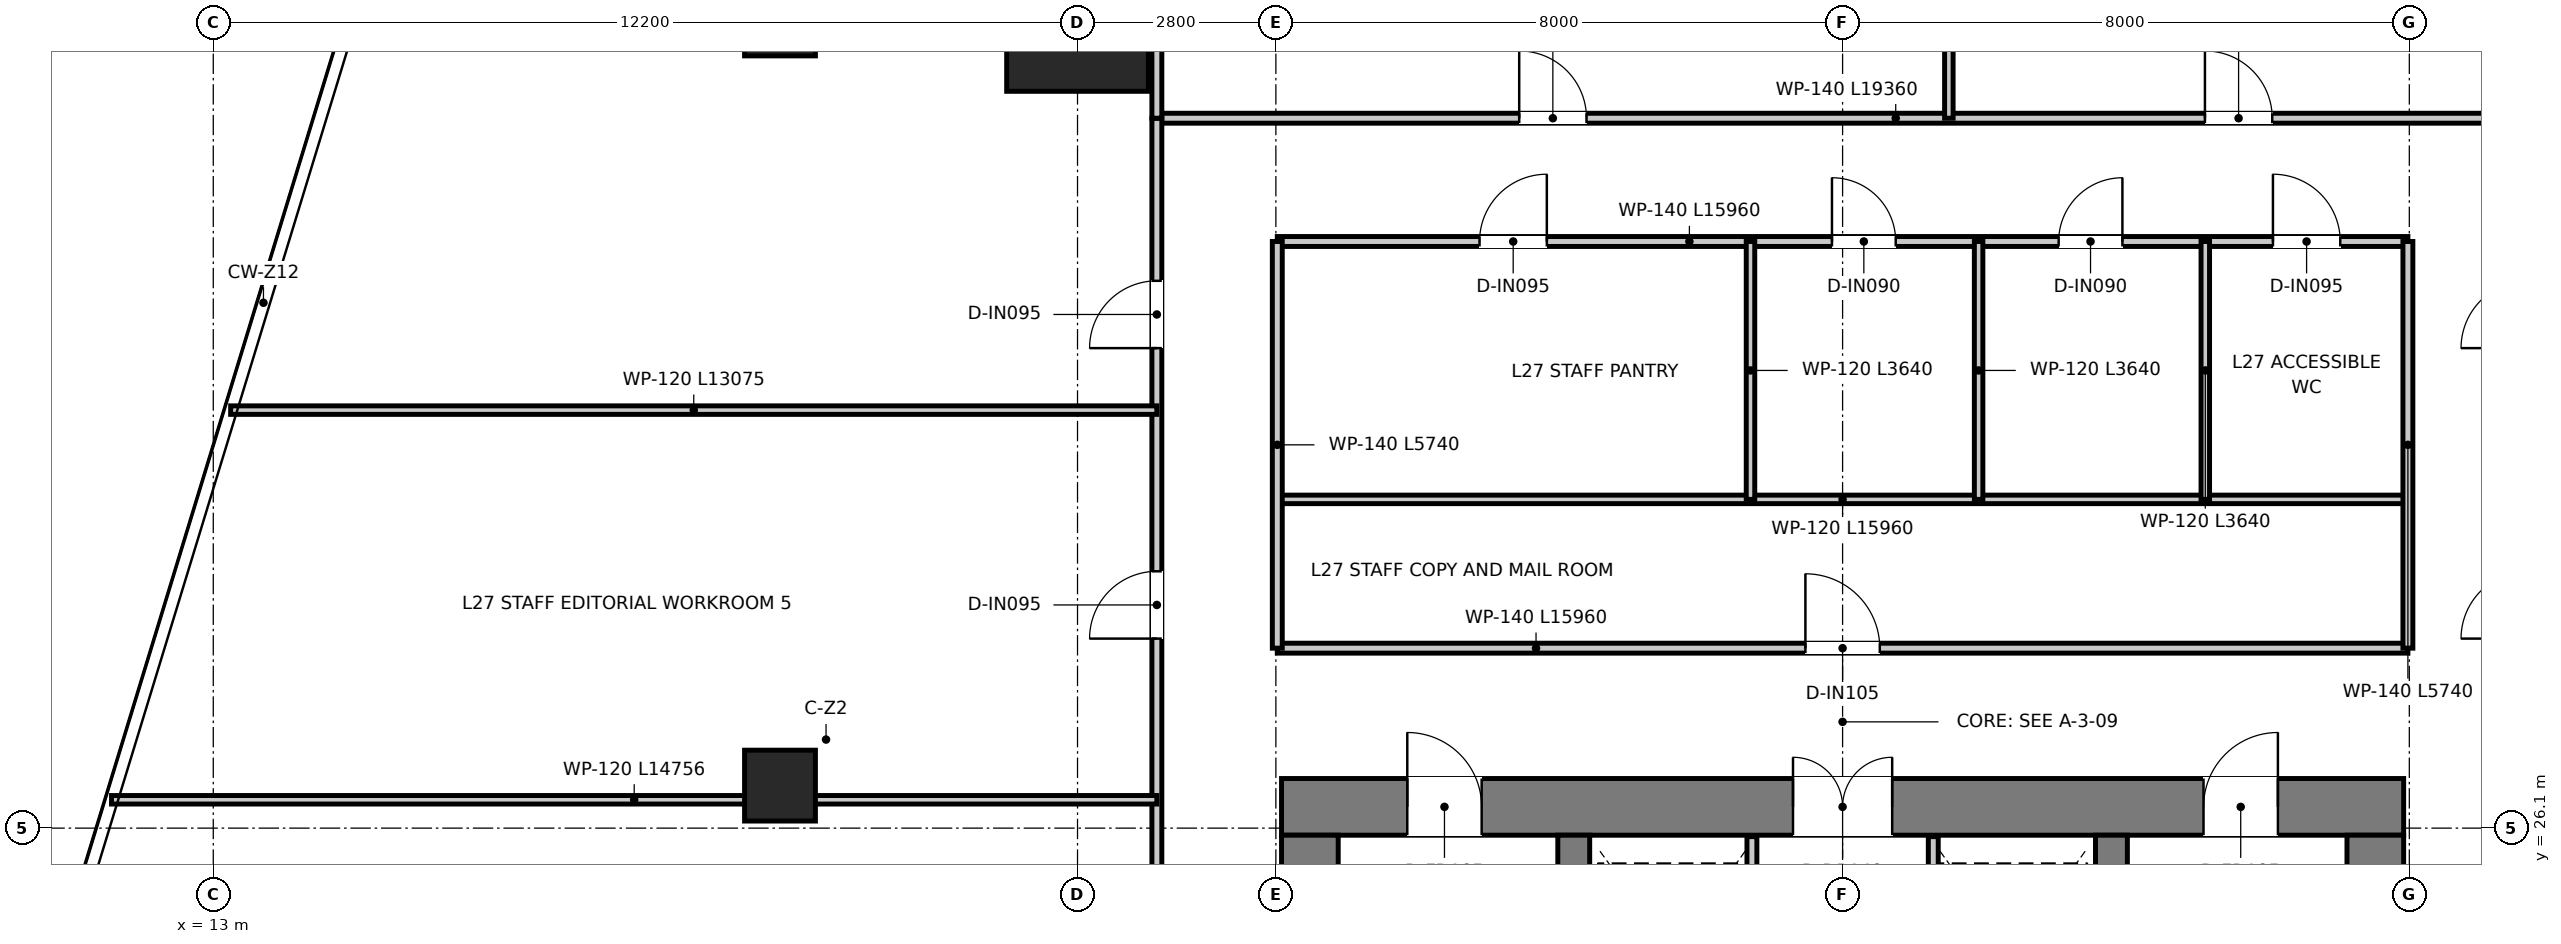
"""IFC4 building model, lengths in metres.
Left out: names, types, materials, properties, quantities, classifications, styles, units other than length and angle.
Written with IfcOpenShell. Run it as: python <this file> out.ifc"""

import sys

from ifc_helpers import new_model, si_unit, direction, frame, frame_2d, origin, origin_2d, place, context, subcontext, project, spatial, rectangle, extrude, source, transform, mapped, element, fill, save


model = new_model("IFC4")
c1 = context("Model", 3, precision=1e-05, world=origin(), true_north=direction((0.0, 1.0)))
c2 = subcontext(c1, "Body", "Model", "MODEL_VIEW")
j1 = project(units=[si_unit("LENGTHUNIT", "METRE"), si_unit("PLANEANGLEUNIT", "RADIAN")], contexts=[c1])
p1 = place(None, origin())
s1 = spatial("IfcSite", under=j1, at=p1, CompositionType="ELEMENT")
p2 = place(p1, origin())
s2 = spatial("IfcBuilding", under=s1, at=p2, CompositionType="ELEMENT")
p3 = place(p2, frame((0.0, 0.0, 113.75)))
s3 = spatial("IfcBuildingStorey", under=s2, at=p3, CompositionType="ELEMENT", Elevation=113.75)
p4 = place(p3, frame((28.08, 26.4, 0.0), z_axis=(0.0, 0.0, 1.0), x_axis=(1.0, 0.0, 0.0)))
e1 = element("IfcWall", 1, at=p4, inside=s3, PredefinedType="SHEAR", context=c2, shape_type="SweptSolid", body=[
    extrude(rectangle(XDim=15.84, YDim=0.8, at=frame_2d((7.92, 0.0))), origin(), (0.0, 0.0, 1.0), 3.95),
])
p5 = place(p4, frame((7.22, 0.0, 0.0)))
e2 = element("IfcOpeningElement", 2, at=p5, cuts=e1, PredefinedType="OPENING", context=c2, shape_type="SweptSolid", body=[
    extrude(rectangle(XDim=1.4, YDim=2.2, at=frame_2d((0.7, 1.1))), frame((0.0, 0.41, 0.0), z_axis=(0.0, -1.0, 0.0), x_axis=(1.0, 0.0, 0.0)), (0.0, 0.0, 1.0), 0.82),
])
p6 = place(p4, frame((1.775, 0.0, 0.0)))
e3 = element("IfcOpeningElement", 3, at=p6, cuts=e1, PredefinedType="OPENING", context=c2, shape_type="SweptSolid", body=[
    extrude(rectangle(XDim=1.05, YDim=2.1, at=frame_2d((0.525, 1.05))), frame((0.0, 0.41, 0.0), z_axis=(0.0, -1.0, 0.0), x_axis=(1.0, 0.0, 0.0)), (0.0, 0.0, 1.0), 0.82),
])
p7 = place(p4, frame((13.015, 0.0, 0.0)))
e4 = element("IfcOpeningElement", 4, at=p7, cuts=e1, PredefinedType="OPENING", context=c2, shape_type="SweptSolid", body=[
    extrude(rectangle(XDim=1.05, YDim=2.1, at=frame_2d((0.525, 1.05))), frame((0.0, 0.41, 0.0), z_axis=(0.0, -1.0, 0.0), x_axis=(1.0, 0.0, 0.0)), (0.0, 0.0, 1.0), 0.82),
])
for number, where, z_axis, x_axis in (
    (5, (28.48, 11.3, 0.0), (0.0, 0.0, 1.0), (0.0, 1.0, 0.0)),
    (6, (43.52, 11.3, 0.0), (0.0, 0.0, 1.0), (0.0, 1.0, 0.0)),
):
    element("IfcWall", number, at=place(p3, frame(where, z_axis=z_axis, x_axis=x_axis)), inside=s3, PredefinedType="SHEAR", context=c2, shape_type="SweptSolid", body=[
        extrude(rectangle(XDim=14.7, YDim=0.8, at=frame_2d((7.35, 0.0))), origin(), (0.0, 0.0, 1.0), 3.95),
    ])
p8 = place(p3, frame((32.205, 13.22, 0.0), z_axis=(0.0, 0.0, 1.0), x_axis=(0.0, 1.0, 0.0)))
e7 = element("IfcWall", 7, at=p8, inside=s3, PredefinedType="SHEAR", context=c2, shape_type="SweptSolid", body=[
    extrude(rectangle(XDim=12.78, YDim=0.45, at=frame_2d((6.39, 0.0))), origin(), (0.0, 0.0, 1.0), 3.95),
])
p9 = place(p8, frame((10.58, 0.0, 0.0)))
e8 = element("IfcOpeningElement", 8, at=p9, cuts=e7, PredefinedType="OPENING", context=c2, shape_type="SweptSolid", body=[
    extrude(rectangle(XDim=1.1, YDim=2.15, at=frame_2d((0.55, 1.075))), frame((0.0, 0.235, 0.0), z_axis=(0.0, -1.0, 0.0), x_axis=(1.0, 0.0, 0.0)), (0.0, 0.0, 1.0), 0.47),
])
p10 = place(p3, frame((39.795, 13.22, 0.0), z_axis=(0.0, 0.0, 1.0), x_axis=(0.0, 1.0, 0.0)))
e9 = element("IfcWall", 9, at=p10, inside=s3, PredefinedType="SHEAR", context=c2, shape_type="SweptSolid", body=[
    extrude(rectangle(XDim=12.78, YDim=0.45, at=frame_2d((6.39, 0.0))), origin(), (0.0, 0.0, 1.0), 3.95),
])
p11 = place(p10, frame((10.58, 0.0, 0.0)))
e10 = element("IfcOpeningElement", 10, at=p11, cuts=e9, PredefinedType="OPENING", context=c2, shape_type="SweptSolid", body=[
    extrude(rectangle(XDim=1.1, YDim=2.15, at=frame_2d((0.55, 1.075))), frame((0.0, 0.235, 0.0), z_axis=(0.0, -1.0, 0.0), x_axis=(1.0, 0.0, 0.0)), (0.0, 0.0, 1.0), 0.47),
])
m1 = source(origin(), c2, "Body", "SweptSolid", [
    extrude(rectangle(XDim=2.0, YDim=2.0, at=origin_2d()), origin(), (0.0, 0.0, 1.0), 3.95),
])
p12 = place(p3, frame((25.2, 37.5, 0.0), z_axis=(0.0, 0.0, 1.0), x_axis=(1.0, 0.0, 0.0)))
e11 = element("IfcColumn", 11, at=p12, inside=s3, PredefinedType="USERDEFINED", context=c2, shape_type="MappedRepresentation", body=[
    mapped(m1, transform((0.0, 0.0, 0.0), x_axis=(1.0, 0.0, 0.0), y_axis=(0.0, 1.0, 0.0), z_axis=(0.0, 0.0, 1.0), scale=1.0)),
])
m2 = source(origin(), c2, "Body", "SweptSolid", [
    extrude(rectangle(XDim=1.0, YDim=1.0, at=origin_2d()), origin(), (0.0, 0.0, 1.0), 3.95),
])
for number, where, z_axis, x_axis in (
    (12, (21.0, 26.7, 0.0), (0.0, 0.0, 1.0), (1.0, 0.0, 0.0)),
    (13, (21.0, 37.5, 0.0), (0.0, 0.0, 1.0), (1.0, 0.0, 0.0)),
):
    element("IfcColumn", number, at=place(p3, frame(where, z_axis=z_axis, x_axis=x_axis)), inside=s3, PredefinedType="COLUMN", context=c2, shape_type="MappedRepresentation", body=[
        mapped(m2, transform((0.0, 0.0, 0.0), x_axis=(1.0, 0.0, 0.0), y_axis=(0.0, 1.0, 0.0), z_axis=(0.0, 0.0, 1.0), scale=1.0)),
    ])
p13 = place(p3, frame((34.72, 20.2, 0.0), z_axis=(0.0, 0.0, 1.0), x_axis=(0.0, 1.0, 0.0)))
e14 = element("IfcWall", 14, at=p13, inside=s3, PredefinedType="PARTITIONING", context=c2, shape_type="SweptSolid", body=[
    extrude(rectangle(XDim=5.78, YDim=0.14, at=frame_2d((2.89, 0.0))), origin(), (0.0, 0.0, 1.0), 2.67),
])
p14 = place(p13, frame((1.05, 0.0, 0.0)))
e15 = element("IfcOpeningElement", 15, at=p14, cuts=e14, PredefinedType="OPENING", context=c2, shape_type="SweptSolid", body=[
    extrude(rectangle(XDim=0.9, YDim=2.1, at=frame_2d((0.45, 1.05))), frame((0.0, 0.08, 0.0), z_axis=(0.0, -1.0, 0.0), x_axis=(1.0, 0.0, 0.0)), (0.0, 0.0, 1.0), 0.16),
])
p15 = place(p3, frame((37.28, 20.2, 0.0), z_axis=(0.0, 0.0, 1.0), x_axis=(0.0, 1.0, 0.0)))
e16 = element("IfcWall", 16, at=p15, inside=s3, PredefinedType="PARTITIONING", context=c2, shape_type="SweptSolid", body=[
    extrude(rectangle(XDim=5.78, YDim=0.14, at=frame_2d((2.89, 0.0))), origin(), (0.0, 0.0, 1.0), 2.67),
])
p16 = place(p15, frame((0.95, 0.0, 0.0)))
e17 = element("IfcOpeningElement", 17, at=p16, cuts=e16, PredefinedType="OPENING", context=c2, shape_type="SweptSolid", body=[
    extrude(rectangle(XDim=1.1, YDim=2.15, at=frame_2d((0.55, 1.075))), frame((0.0, 0.08, 0.0), z_axis=(0.0, -1.0, 0.0), x_axis=(1.0, 0.0, 0.0)), (0.0, 0.0, 1.0), 0.16),
])
p17 = place(p3, frame((28.02, 28.64, 0.0), z_axis=(0.0, 0.0, 1.0), x_axis=(1.0, 0.0, 0.0)))
e18 = element("IfcWall", 18, at=p17, inside=s3, PredefinedType="PARTITIONING", context=c2, shape_type="SweptSolid", body=[
    extrude(rectangle(XDim=15.96, YDim=0.14, at=frame_2d((7.98, 0.0))), origin(), (0.0, 0.0, 1.0), 3.08),
])
p18 = place(p17, frame((7.455, 0.0, 0.0)))
e19 = element("IfcOpeningElement", 19, at=p18, cuts=e18, PredefinedType="OPENING", context=c2, shape_type="SweptSolid", body=[
    extrude(rectangle(XDim=1.05, YDim=2.15, at=frame_2d((0.525, 1.075))), frame((0.0, 0.08, 0.0), z_axis=(0.0, -1.0, 0.0), x_axis=(1.0, 0.0, 0.0)), (0.0, 0.0, 1.0), 0.16),
])
p19 = place(p3, frame((28.02, 30.74, 0.0), z_axis=(0.0, 0.0, 1.0), x_axis=(1.0, 0.0, 0.0)))
e20 = element("IfcWall", 20, at=p19, inside=s3, PredefinedType="PARTITIONING", context=c2, shape_type="SweptSolid", body=[
    extrude(rectangle(XDim=15.96, YDim=0.12, at=frame_2d((7.98, 0.0))), origin(), (0.0, 0.0, 1.0), 3.08),
])
p20 = place(p3, frame((28.02, 34.38, 0.0), z_axis=(0.0, 0.0, 1.0), x_axis=(1.0, 0.0, 0.0)))
e21 = element("IfcWall", 21, at=p20, inside=s3, PredefinedType="PARTITIONING", context=c2, shape_type="SweptSolid", body=[
    extrude(rectangle(XDim=15.96, YDim=0.14, at=frame_2d((7.98, 0.0))), origin(), (0.0, 0.0, 1.0), 3.08),
])
p21 = place(p20, frame((7.83, 0.0, 0.0)))
e22 = element("IfcOpeningElement", 22, at=p21, cuts=e21, PredefinedType="OPENING", context=c2, shape_type="SweptSolid", body=[
    extrude(rectangle(XDim=0.9, YDim=2.1, at=frame_2d((0.45, 1.05))), frame((0.0, 0.08, 0.0), z_axis=(0.0, -1.0, 0.0), x_axis=(1.0, 0.0, 0.0)), (0.0, 0.0, 1.0), 0.16),
])
p22 = place(p20, frame((11.03, 0.0, 0.0)))
e23 = element("IfcOpeningElement", 23, at=p22, cuts=e21, PredefinedType="OPENING", context=c2, shape_type="SweptSolid", body=[
    extrude(rectangle(XDim=0.9, YDim=2.1, at=frame_2d((0.45, 1.05))), frame((0.0, 0.08, 0.0), z_axis=(0.0, -1.0, 0.0), x_axis=(1.0, 0.0, 0.0)), (0.0, 0.0, 1.0), 0.16),
])
p23 = place(p20, frame((14.055, 0.0, 0.0)))
e24 = element("IfcOpeningElement", 24, at=p23, cuts=e21, PredefinedType="OPENING", context=c2, shape_type="SweptSolid", body=[
    extrude(rectangle(XDim=0.95, YDim=2.1, at=frame_2d((0.475, 1.05))), frame((0.0, 0.08, 0.0), z_axis=(0.0, -1.0, 0.0), x_axis=(1.0, 0.0, 0.0)), (0.0, 0.0, 1.0), 0.16),
])
p24 = place(p20, frame((2.855, 0.0, 0.0)))
e25 = element("IfcOpeningElement", 25, at=p24, cuts=e21, PredefinedType="OPENING", context=c2, shape_type="SweptSolid", body=[
    extrude(rectangle(XDim=0.95, YDim=2.1, at=frame_2d((0.475, 1.05))), frame((0.0, 0.08, 0.0), z_axis=(0.0, -1.0, 0.0), x_axis=(1.0, 0.0, 0.0)), (0.0, 0.0, 1.0), 0.16),
])
for number, where, z_axis, x_axis in (
    (26, (28.02, 28.64, 0.0), (0.0, 0.0, 1.0), (0.0, 1.0, 0.0)),
    (27, (43.98, 28.64, 0.0), (0.0, 0.0, 1.0), (0.0, 1.0, 0.0)),
):
    element("IfcWall", number, at=place(p3, frame(where, z_axis=z_axis, x_axis=x_axis)), inside=s3, PredefinedType="PARTITIONING", context=c2, shape_type="SweptSolid", body=[
        extrude(rectangle(XDim=5.74, YDim=0.14, at=frame_2d((2.87, 0.0))), origin(), (0.0, 0.0, 1.0), 3.27),
    ])
for number, where, z_axis, x_axis in (
    (28, (37.92, 30.74, 0.0), (0.0, 0.0, 1.0), (0.0, 1.0, 0.0)),
    (29, (41.12, 30.74, 0.0), (0.0, 0.0, 1.0), (0.0, 1.0, 0.0)),
    (30, (34.7, 30.74, 0.0), (0.0, 0.0, 1.0), (0.0, 1.0, 0.0)),
):
    element("IfcWall", number, at=place(p3, frame(where, z_axis=z_axis, x_axis=x_axis)), inside=s3, PredefinedType="PARTITIONING", context=c2, shape_type="SweptSolid", body=[
        extrude(rectangle(XDim=3.64, YDim=0.12, at=frame_2d((1.82, 0.0))), origin(), (0.0, 0.0, 1.0), 3.17),
    ])
p25 = place(p3, frame((26.32, 36.12, 0.0), z_axis=(0.0, 0.0, 1.0), x_axis=(1.0, 0.0, 0.0)))
e31 = element("IfcWall", 31, at=p25, inside=s3, PredefinedType="PARTITIONING", context=c2, shape_type="SweptSolid", body=[
    extrude(rectangle(XDim=19.36, YDim=0.14, at=frame_2d((9.68, 0.0))), origin(), (0.0, 0.0, 1.0), 3.08),
])
p26 = place(p25, frame((5.115, 0.0, 0.0)))
e32 = element("IfcOpeningElement", 32, at=p26, cuts=e31, PredefinedType="OPENING", context=c2, shape_type="SweptSolid", body=[
    extrude(rectangle(XDim=0.95, YDim=2.1, at=frame_2d((0.475, 1.05))), frame((0.0, 0.08, 0.0), z_axis=(0.0, -1.0, 0.0), x_axis=(1.0, 0.0, 0.0)), (0.0, 0.0, 1.0), 0.16),
])
p27 = place(p25, frame((14.795, 0.0, 0.0)))
e33 = element("IfcOpeningElement", 33, at=p27, cuts=e31, PredefinedType="OPENING", context=c2, shape_type="SweptSolid", body=[
    extrude(rectangle(XDim=0.95, YDim=2.1, at=frame_2d((0.475, 1.05))), frame((0.0, 0.08, 0.0), z_axis=(0.0, -1.0, 0.0), x_axis=(1.0, 0.0, 0.0)), (0.0, 0.0, 1.0), 0.16),
])
p28 = place(p3, frame((26.32, 10.5, 0.0), z_axis=(0.0, 0.0, 1.0), x_axis=(0.0, 1.0, 0.0)))
e34 = element("IfcWall", 34, at=p28, inside=s3, PredefinedType="PARTITIONING", context=c2, shape_type="SweptSolid", body=[
    extrude(rectangle(XDim=25.62, YDim=0.14, at=frame_2d((12.81, 0.0))), origin(), (0.0, 0.0, 1.0), 2.97),
])
p29 = place(p28, frame((8.275, 0.0, 0.0)))
e35 = element("IfcOpeningElement", 35, at=p29, cuts=e34, PredefinedType="OPENING", context=c2, shape_type="SweptSolid", body=[
    extrude(rectangle(XDim=0.95, YDim=2.1, at=frame_2d((0.475, 1.05))), frame((0.0, 0.08, 0.0), z_axis=(0.0, -1.0, 0.0), x_axis=(1.0, 0.0, 0.0)), (0.0, 0.0, 1.0), 0.16),
])
p30 = place(p28, frame((12.775, 0.0, 0.0)))
e36 = element("IfcOpeningElement", 36, at=p30, cuts=e34, PredefinedType="OPENING", context=c2, shape_type="SweptSolid", body=[
    extrude(rectangle(XDim=0.95, YDim=2.1, at=frame_2d((0.475, 1.05))), frame((0.0, 0.08, 0.0), z_axis=(0.0, -1.0, 0.0), x_axis=(1.0, 0.0, 0.0)), (0.0, 0.0, 1.0), 0.16),
])
p31 = place(p28, frame((18.275, 0.0, 0.0)))
e37 = element("IfcOpeningElement", 37, at=p31, cuts=e34, PredefinedType="OPENING", context=c2, shape_type="SweptSolid", body=[
    extrude(rectangle(XDim=0.95, YDim=2.1, at=frame_2d((0.475, 1.05))), frame((0.0, 0.08, 0.0), z_axis=(0.0, -1.0, 0.0), x_axis=(1.0, 0.0, 0.0)), (0.0, 0.0, 1.0), 0.16),
])
p32 = place(p28, frame((22.375, 0.0, 0.0)))
e38 = element("IfcOpeningElement", 38, at=p32, cuts=e34, PredefinedType="OPENING", context=c2, shape_type="SweptSolid", body=[
    extrude(rectangle(XDim=0.95, YDim=2.1, at=frame_2d((0.475, 1.05))), frame((0.0, 0.08, 0.0), z_axis=(0.0, -1.0, 0.0), x_axis=(1.0, 0.0, 0.0)), (0.0, 0.0, 1.0), 0.16),
])
p33 = place(p3, frame((26.32, 36.12, 0.0), z_axis=(0.0, 0.0, 1.0), x_axis=(0.0, 1.0, 0.0)))
e39 = element("IfcWall", 39, at=p33, inside=s3, PredefinedType="PARTITIONING", context=c2, shape_type="SweptSolid", body=[
    extrude(rectangle(XDim=17.914, YDim=0.14, at=frame_2d((8.957, 0.0))), origin(), (0.0, 0.0, 1.0), 2.97),
])
p34 = place(p3, frame((37.5, 36.12, 0.0), z_axis=(0.0, 0.0, 1.0), x_axis=(0.0, 1.0, 0.0)))
e40 = element("IfcWall", 40, at=p34, inside=s3, PredefinedType="PARTITIONING", context=c2, shape_type="SweptSolid", body=[
    extrude(rectangle(XDim=14.496, YDim=0.12, at=frame_2d((7.248, 0.0))), origin(), (0.0, 0.0, 1.0), 2.97),
])
p35 = place(p3, frame((11.564, 26.5, 0.0), z_axis=(0.0, 0.0, 1.0), x_axis=(1.0, 0.0, 0.0)))
e41 = element("IfcWall", 41, at=p35, inside=s3, PredefinedType="PARTITIONING", context=c2, shape_type="SweptSolid", body=[
    extrude(rectangle(XDim=14.756, YDim=0.12, at=frame_2d((7.378, 0.0))), origin(), (0.0, 0.0, 1.0), 2.97),
])
p36 = place(p3, frame((13.245, 32.0, 0.0), z_axis=(0.0, 0.0, 1.0), x_axis=(1.0, 0.0, 0.0)))
e42 = element("IfcWall", 42, at=p36, inside=s3, PredefinedType="PARTITIONING", context=c2, shape_type="SweptSolid", body=[
    extrude(rectangle(XDim=13.075, YDim=0.12, at=frame_2d((6.537, 0.0))), origin(), (0.0, 0.0, 1.0), 2.97),
])
p37 = place(p5, origin())
e43 = element("IfcDoor", 43, at=p37, inside=s3, OperationType="DOUBLE_DOOR_SINGLE_SWING", PredefinedType="DOOR", context=c2, shape_type="SweptSolid", body=[
    extrude(rectangle(XDim=1.4, YDim=2.2, at=frame_2d((0.7, 1.1))), frame((0.0, 0.025, 0.0), z_axis=(0.0, -1.0, 0.0), x_axis=(1.0, 0.0, 0.0)), (0.0, 0.0, 1.0), 0.05),
])
fill(e2, e43)
p38 = place(p6, origin())
e44 = element("IfcDoor", 44, at=p38, inside=s3, OperationType="SINGLE_SWING_LEFT", PredefinedType="DOOR", context=c2, shape_type="SweptSolid", body=[
    extrude(rectangle(XDim=1.05, YDim=2.1, at=frame_2d((0.525, 1.05))), frame((0.0, 0.025, 0.0), z_axis=(0.0, -1.0, 0.0), x_axis=(1.0, 0.0, 0.0)), (0.0, 0.0, 1.0), 0.05),
])
fill(e3, e44)
p39 = place(p7, origin())
e45 = element("IfcDoor", 45, at=p39, inside=s3, OperationType="SINGLE_SWING_RIGHT", PredefinedType="DOOR", context=c2, shape_type="SweptSolid", body=[
    extrude(rectangle(XDim=1.05, YDim=2.1, at=frame_2d((0.525, 1.05))), frame((0.0, 0.025, 0.0), z_axis=(0.0, -1.0, 0.0), x_axis=(1.0, 0.0, 0.0)), (0.0, 0.0, 1.0), 0.05),
])
fill(e4, e45)
p40 = place(p18, origin())
e46 = element("IfcDoor", 46, at=p40, inside=s3, OperationType="SINGLE_SWING_LEFT", PredefinedType="DOOR", context=c2, shape_type="SweptSolid", body=[
    extrude(rectangle(XDim=1.05, YDim=2.15, at=frame_2d((0.525, 1.075))), frame((0.0, 0.025, 0.0), z_axis=(0.0, -1.0, 0.0), x_axis=(1.0, 0.0, 0.0)), (0.0, 0.0, 1.0), 0.05),
])
fill(e19, e46)
p41 = place(p21, origin())
e47 = element("IfcDoor", 47, at=p41, inside=s3, OperationType="SINGLE_SWING_LEFT", PredefinedType="DOOR", context=c2, shape_type="SweptSolid", body=[
    extrude(rectangle(XDim=0.9, YDim=2.1, at=frame_2d((0.45, 1.05))), frame((0.0, 0.025, 0.0), z_axis=(0.0, -1.0, 0.0), x_axis=(1.0, 0.0, 0.0)), (0.0, 0.0, 1.0), 0.05),
])
fill(e22, e47)
p42 = place(p22, origin())
e48 = element("IfcDoor", 48, at=p42, inside=s3, OperationType="SINGLE_SWING_RIGHT", PredefinedType="DOOR", context=c2, shape_type="SweptSolid", body=[
    extrude(rectangle(XDim=0.9, YDim=2.1, at=frame_2d((0.45, 1.05))), frame((0.0, 0.025, 0.0), z_axis=(0.0, -1.0, 0.0), x_axis=(1.0, 0.0, 0.0)), (0.0, 0.0, 1.0), 0.05),
])
fill(e23, e48)
p43 = place(p23, origin())
e49 = element("IfcDoor", 49, at=p43, inside=s3, OperationType="SINGLE_SWING_LEFT", PredefinedType="DOOR", context=c2, shape_type="SweptSolid", body=[
    extrude(rectangle(XDim=0.95, YDim=2.1, at=frame_2d((0.475, 1.05))), frame((0.0, 0.025, 0.0), z_axis=(0.0, -1.0, 0.0), x_axis=(1.0, 0.0, 0.0)), (0.0, 0.0, 1.0), 0.05),
])
fill(e24, e49)
p44 = place(p24, origin())
e50 = element("IfcDoor", 50, at=p44, inside=s3, OperationType="SINGLE_SWING_RIGHT", PredefinedType="DOOR", context=c2, shape_type="SweptSolid", body=[
    extrude(rectangle(XDim=0.95, YDim=2.1, at=frame_2d((0.475, 1.05))), frame((0.0, 0.025, 0.0), z_axis=(0.0, -1.0, 0.0), x_axis=(1.0, 0.0, 0.0)), (0.0, 0.0, 1.0), 0.05),
])
fill(e25, e50)
p45 = place(p26, origin())
e51 = element("IfcDoor", 51, at=p45, inside=s3, OperationType="SINGLE_SWING_LEFT", PredefinedType="DOOR", context=c2, shape_type="SweptSolid", body=[
    extrude(rectangle(XDim=0.95, YDim=2.1, at=frame_2d((0.475, 1.05))), frame((0.0, 0.025, 0.0), z_axis=(0.0, -1.0, 0.0), x_axis=(1.0, 0.0, 0.0)), (0.0, 0.0, 1.0), 0.05),
])
fill(e32, e51)
p46 = place(p27, origin())
e52 = element("IfcDoor", 52, at=p46, inside=s3, OperationType="SINGLE_SWING_LEFT", PredefinedType="DOOR", context=c2, shape_type="SweptSolid", body=[
    extrude(rectangle(XDim=0.95, YDim=2.1, at=frame_2d((0.475, 1.05))), frame((0.0, 0.025, 0.0), z_axis=(0.0, -1.0, 0.0), x_axis=(1.0, 0.0, 0.0)), (0.0, 0.0, 1.0), 0.05),
])
fill(e33, e52)
p47 = place(p31, origin())
e53 = element("IfcDoor", 53, at=p47, inside=s3, OperationType="SINGLE_SWING_LEFT", PredefinedType="DOOR", context=c2, shape_type="SweptSolid", body=[
    extrude(rectangle(XDim=0.95, YDim=2.1, at=frame_2d((0.475, 1.05))), frame((0.0, 0.025, 0.0), z_axis=(0.0, -1.0, 0.0), x_axis=(1.0, 0.0, 0.0)), (0.0, 0.0, 1.0), 0.05),
])
fill(e37, e53)
p48 = place(p32, origin())
e54 = element("IfcDoor", 54, at=p48, inside=s3, OperationType="SINGLE_SWING_LEFT", PredefinedType="DOOR", context=c2, shape_type="SweptSolid", body=[
    extrude(rectangle(XDim=0.95, YDim=2.1, at=frame_2d((0.475, 1.05))), frame((0.0, 0.025, 0.0), z_axis=(0.0, -1.0, 0.0), x_axis=(1.0, 0.0, 0.0)), (0.0, 0.0, 1.0), 0.05),
])
fill(e38, e54)
save(model, sys.argv[1])
